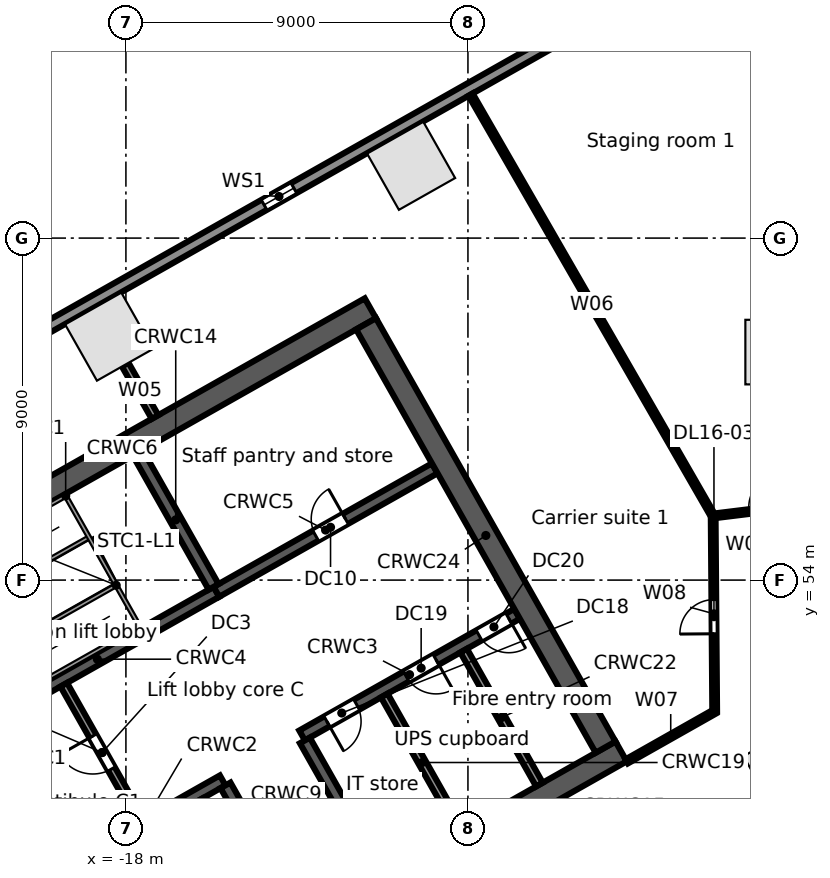
"""IFC4 building model, lengths in metres.
Left out: names, types, materials, properties, quantities, classifications, styles, units other than length and angle.
Written with IfcOpenShell. Run it as: python <this file> out.ifc"""

import sys

from ifc_helpers import new_model, si_unit, direction, frame, frame_2d, origin, origin_2d, place, context, subcontext, project, spatial, rectangle, extrude, element, fill, save


model = new_model("IFC4")
c1 = context("Model", 3, precision=1e-05, world=origin(), true_north=direction((0.0, 1.0)))
c2 = subcontext(c1, "Body", "Model", "MODEL_VIEW")
j1 = project(units=[si_unit("LENGTHUNIT", "METRE"), si_unit("PLANEANGLEUNIT", "RADIAN")], contexts=[c1])
p1 = place(None, origin())
s1 = spatial("IfcSite", under=j1, at=p1, CompositionType="ELEMENT")
p2 = place(p1, origin())
s2 = spatial("IfcBuilding", under=s1, at=p2, CompositionType="ELEMENT")
p3 = place(p2, frame((0.0, 0.0, 81.5)))
s3 = spatial("IfcBuildingStorey", under=s2, at=p3, CompositionType="ELEMENT", Elevation=81.5)
for number, where, z_axis, x_axis in (
    (1, (-10.495, 64.902, 0.0), (0.0, 0.0, 1.0), (-0.87, -0.492, 0.0)),
    (2, (-18.441, 60.406, 0.0), (0.0, 0.0, 1.0), (-0.87, -0.492, 0.0)),
    (3, (-0.591, 49.044, 0.0), (0.0, 0.0, 1.0), (0.87, 0.492, 0.0)),
    (4, (-0.85, 60.0, 0.0), (0.0, 0.0, 1.0), (0.0, 1.0, 0.0)),
):
    element("IfcColumn", number, at=place(p3, frame(where, z_axis=z_axis, x_axis=x_axis)), inside=s3, PredefinedType="COLUMN", context=c2, shape_type="SweptSolid", body=[
        extrude(rectangle(XDim=1.7, YDim=1.7, at=origin_2d()), origin(), (0.0, 0.0, 1.0), 5.0),
    ])
p4 = place(p3, frame((-58.745, 38.764, 0.0), z_axis=(0.0, 0.0, 1.0), x_axis=(0.870355811726, 0.492423355453, 0.0)))
e5 = element("IfcWall", 5, at=p4, inside=s3, PredefinedType="STANDARD", context=c2, shape_type="SweptSolid", body=[
    extrude(rectangle(XDim=64.025, YDim=0.3, at=frame_2d((32.013, 0.0))), origin(), (0.0, 0.0, 1.0), 4.68),
])
p5 = place(p4, frame((60.122, 0.0, 0.6)))
e6 = element("IfcOpeningElement", 6, at=p5, cuts=e5, PredefinedType="OPENING", context=c2, shape_type="SweptSolid", body=[
    extrude(rectangle(XDim=0.9, YDim=3.2, at=frame_2d((0.45, 1.6))), frame((0.0, 0.16, 0.0), z_axis=(0.0, -1.0, 0.0), x_axis=(1.0, 0.0, 0.0)), (0.0, 0.0, 1.0), 0.32),
])
p6 = place(p4, frame((50.992, 0.0, 0.6)))
e7 = element("IfcOpeningElement", 7, at=p6, cuts=e5, PredefinedType="OPENING", context=c2, shape_type="SweptSolid", body=[
    extrude(rectangle(XDim=0.9, YDim=3.2, at=frame_2d((0.45, 1.6))), frame((0.0, 0.16, 0.0), z_axis=(0.0, -1.0, 0.0), x_axis=(1.0, 0.0, 0.0)), (0.0, 0.0, 1.0), 0.32),
])
p7 = place(p4, frame((41.862, 0.0, 0.6)))
e8 = element("IfcOpeningElement", 8, at=p7, cuts=e5, PredefinedType="OPENING", context=c2, shape_type="SweptSolid", body=[
    extrude(rectangle(XDim=0.9, YDim=3.2, at=frame_2d((0.45, 1.6))), frame((0.0, 0.16, 0.0), z_axis=(0.0, -1.0, 0.0), x_axis=(1.0, 0.0, 0.0)), (0.0, 0.0, 1.0), 0.32),
])
p8 = place(p4, frame((32.732, 0.0, 0.6)))
e9 = element("IfcOpeningElement", 9, at=p8, cuts=e5, PredefinedType="OPENING", context=c2, shape_type="SweptSolid", body=[
    extrude(rectangle(XDim=0.9, YDim=3.2, at=frame_2d((0.45, 1.6))), frame((0.0, 0.16, 0.0), z_axis=(0.0, -1.0, 0.0), x_axis=(1.0, 0.0, 0.0)), (0.0, 0.0, 1.0), 0.32),
])
p9 = place(p4, frame((23.602, 0.0, 0.6)))
e10 = element("IfcOpeningElement", 10, at=p9, cuts=e5, PredefinedType="OPENING", context=c2, shape_type="SweptSolid", body=[
    extrude(rectangle(XDim=0.9, YDim=3.2, at=frame_2d((0.45, 1.6))), frame((0.0, 0.16, 0.0), z_axis=(0.0, -1.0, 0.0), x_axis=(1.0, 0.0, 0.0)), (0.0, 0.0, 1.0), 0.32),
])
p10 = place(p4, frame((14.472, 0.0, 0.6)))
e11 = element("IfcOpeningElement", 11, at=p10, cuts=e5, PredefinedType="OPENING", context=c2, shape_type="SweptSolid", body=[
    extrude(rectangle(XDim=0.9, YDim=3.2, at=frame_2d((0.45, 1.6))), frame((0.0, 0.16, 0.0), z_axis=(0.0, -1.0, 0.0), x_axis=(1.0, 0.0, 0.0)), (0.0, 0.0, 1.0), 0.32),
])
p11 = place(p4, frame((5.342, 0.0, 0.6)))
e12 = element("IfcOpeningElement", 12, at=p11, cuts=e5, PredefinedType="OPENING", context=c2, shape_type="SweptSolid", body=[
    extrude(rectangle(XDim=0.9, YDim=3.2, at=frame_2d((0.45, 1.6))), frame((0.0, 0.16, 0.0), z_axis=(0.0, -1.0, 0.0), x_axis=(1.0, 0.0, 0.0)), (0.0, 0.0, 1.0), 0.32),
])
p12 = place(p3, frame((-18.024, 42.104, 0.0), z_axis=(0.0, 0.0, 1.0), x_axis=(0.870360574057, 0.492414937962, 0.0)))
e13 = element("IfcWall", 13, at=p12, inside=s3, PredefinedType="SOLIDWALL", context=c2, shape_type="SweptSolid", body=[
    extrude(rectangle(XDim=15.0, YDim=0.6, at=frame_2d((7.5, 0.0))), origin(), (0.0, 0.0, 1.0), 4.68),
])
p13 = place(p12, frame((6.1, 0.0, 0.0)))
e14 = element("IfcOpeningElement", 14, at=p13, cuts=e13, PredefinedType="OPENING", context=c2, shape_type="SweptSolid", body=[
    extrude(rectangle(XDim=1.2, YDim=2.1, at=frame_2d((0.6, 1.05))), frame((0.0, 0.31, 0.0), z_axis=(0.0, -1.0, 0.0), x_axis=(1.0, 0.0, 0.0)), (0.0, 0.0, 1.0), 0.62),
])
p14 = place(p3, frame((-19.718, 46.316, 0.0), z_axis=(0.0, 0.0, 1.0), x_axis=(0.870353963862, 0.492426621528, 0.0)))
e15 = element("IfcWall", 15, at=p14, inside=s3, PredefinedType="SOLIDWALL", context=c2, shape_type="SweptSolid", body=[
    extrude(rectangle(XDim=4.9, YDim=0.3, at=frame_2d((2.45, 0.0))), origin(), (0.0, 0.0, 1.0), 4.68),
])
p15 = place(p14, frame((0.55, 0.0, 0.0)))
e16 = element("IfcOpeningElement", 16, at=p15, cuts=e15, PredefinedType="OPENING", context=c2, shape_type="SweptSolid", body=[
    extrude(rectangle(XDim=1.1, YDim=2.1, at=frame_2d((0.55, 1.05))), frame((0.0, 0.16, 0.0), z_axis=(0.0, -1.0, 0.0), x_axis=(1.0, 0.0, 0.0)), (0.0, 0.0, 1.0), 0.32),
])
p16 = place(p14, frame((2.85, 0.0, 0.0)))
e17 = element("IfcOpeningElement", 17, at=p16, cuts=e15, PredefinedType="OPENING", context=c2, shape_type="SweptSolid", body=[
    extrude(rectangle(XDim=0.9, YDim=2.1, at=frame_2d((0.45, 1.05))), frame((0.0, 0.16, 0.0), z_axis=(0.0, -1.0, 0.0), x_axis=(1.0, 0.0, 0.0)), (0.0, 0.0, 1.0), 0.32),
])
p17 = place(p3, frame((-13.365, 49.911, 0.0), z_axis=(0.0, 0.0, 1.0), x_axis=(0.870340995471, 0.49244954219, 0.0)))
e18 = element("IfcWall", 18, at=p17, inside=s3, PredefinedType="SOLIDWALL", context=c2, shape_type="SweptSolid", body=[
    extrude(rectangle(XDim=6.5, YDim=0.3, at=frame_2d((3.25, 0.0))), origin(), (0.0, 0.0, 1.0), 4.68),
])
p18 = place(p17, frame((0.75, 0.0, 0.0)))
e19 = element("IfcOpeningElement", 19, at=p18, cuts=e18, PredefinedType="OPENING", context=c2, shape_type="SweptSolid", body=[
    extrude(rectangle(XDim=0.9, YDim=2.1, at=frame_2d((0.45, 1.05))), frame((0.0, 0.16, 0.0), z_axis=(0.0, -1.0, 0.0), x_axis=(1.0, 0.0, 0.0)), (0.0, 0.0, 1.0), 0.32),
])
p19 = place(p17, frame((3.15, 0.0, 0.0)))
e20 = element("IfcOpeningElement", 20, at=p19, cuts=e18, PredefinedType="OPENING", context=c2, shape_type="SweptSolid", body=[
    extrude(rectangle(XDim=0.9, YDim=2.1, at=frame_2d((0.45, 1.05))), frame((0.0, 0.16, 0.0), z_axis=(0.0, -1.0, 0.0), x_axis=(1.0, 0.0, 0.0)), (0.0, 0.0, 1.0), 0.32),
])
p20 = place(p17, frame((5.35, 0.0, 0.0)))
e21 = element("IfcOpeningElement", 21, at=p20, cuts=e18, PredefinedType="OPENING", context=c2, shape_type="SweptSolid", body=[
    extrude(rectangle(XDim=0.9, YDim=2.1, at=frame_2d((0.45, 1.05))), frame((0.0, 0.16, 0.0), z_axis=(0.0, -1.0, 0.0), x_axis=(1.0, 0.0, 0.0)), (0.0, 0.0, 1.0), 0.32),
])
p21 = place(p3, frame((-21.885, 50.146, 0.0), z_axis=(0.0, 0.0, 1.0), x_axis=(0.870359411463, 0.492416992881, 0.0)))
e22 = element("IfcWall", 22, at=p21, inside=s3, PredefinedType="SOLIDWALL", context=c2, shape_type="SweptSolid", body=[
    extrude(rectangle(XDim=7.2, YDim=0.3, at=frame_2d((3.6, 0.0))), origin(), (0.0, 0.0, 1.0), 4.68),
])
p22 = place(p21, frame((0.2, 0.0, 0.0)))
e23 = element("IfcOpeningElement", 23, at=p22, cuts=e22, PredefinedType="OPENING", context=c2, shape_type="SweptSolid", body=[
    extrude(rectangle(XDim=1.0, YDim=2.1, at=frame_2d((0.5, 1.05))), frame((0.0, 0.16, 0.0), z_axis=(0.0, -1.0, 0.0), x_axis=(1.0, 0.0, 0.0)), (0.0, 0.0, 1.0), 0.32),
])
p23 = place(p3, frame((-15.618, 53.691, 0.0), z_axis=(0.0, 0.0, 1.0), x_axis=(0.870356769198, 0.492421663121, 0.0)))
e24 = element("IfcWall", 24, at=p23, inside=s3, PredefinedType="SOLIDWALL", context=c2, shape_type="SweptSolid", body=[
    extrude(rectangle(XDim=6.6, YDim=0.3, at=frame_2d((3.3, 0.0))), origin(), (0.0, 0.0, 1.0), 4.68),
])
p24 = place(p23, frame((3.0, 0.0, 0.0)))
e25 = element("IfcOpeningElement", 25, at=p24, cuts=e24, PredefinedType="OPENING", context=c2, shape_type="SweptSolid", body=[
    extrude(rectangle(XDim=0.9, YDim=2.1, at=frame_2d((0.45, 1.05))), frame((0.0, 0.16, 0.0), z_axis=(0.0, -1.0, 0.0), x_axis=(1.0, 0.0, 0.0)), (0.0, 0.0, 1.0), 0.32),
])
p25 = place(p3, frame((-24.623, 53.767, 0.0), z_axis=(0.0, 0.0, 1.0), x_axis=(0.870356627484, 0.492421913601, 0.0)))
e26 = element("IfcWall", 26, at=p25, inside=s3, PredefinedType="SOLIDWALL", context=c2, shape_type="SweptSolid", body=[
    extrude(rectangle(XDim=15.0, YDim=0.6, at=frame_2d((7.5, 0.0))), origin(), (0.0, 0.0, 1.0), 4.68),
])
p26 = place(p3, frame((-24.214, 53.654, 0.0), z_axis=(0.0, 0.0, 1.0), x_axis=(0.492441221355, -0.870345703448, 0.0)))
e27 = element("IfcWall", 27, at=p26, inside=s3, PredefinedType="SOLIDWALL", context=c2, shape_type="SweptSolid", body=[
    extrude(rectangle(XDim=12.8, YDim=0.6, at=frame_2d((6.4, 0.0))), origin(), (0.0, 0.0, 1.0), 4.68),
])
p27 = place(p3, frame((-19.635, 51.246, 0.0), z_axis=(0.0, 0.0, 1.0), x_axis=(0.492408451753, -0.87036424366, 0.0)))
e28 = element("IfcWall", 28, at=p27, inside=s3, PredefinedType="PARTITIONING", context=c2, shape_type="SweptSolid", body=[
    extrude(rectangle(XDim=4.1, YDim=0.2, at=frame_2d((2.05, 0.0))), origin(), (0.0, 0.0, 1.0), 4.68),
])
p28 = place(p27, frame((1.55, 0.0, 0.0)))
e29 = element("IfcOpeningElement", 29, at=p28, cuts=e28, PredefinedType="OPENING", context=c2, shape_type="SweptSolid", body=[
    extrude(rectangle(XDim=1.0, YDim=2.1, at=frame_2d((0.5, 1.05))), frame((0.0, 0.11, 0.0), z_axis=(0.0, -1.0, 0.0), x_axis=(1.0, 0.0, 0.0)), (0.0, 0.0, 1.0), 0.22),
])
p29 = place(p3, frame((-15.379, 48.599, 0.0), z_axis=(0.0, 0.0, 1.0), x_axis=(0.492394910396, -0.870371904542, 0.0)))
e30 = element("IfcWall", 30, at=p29, inside=s3, PredefinedType="SOLIDWALL", context=c2, shape_type="SweptSolid", body=[
    extrude(rectangle(XDim=4.05, YDim=0.3, at=frame_2d((2.025, 0.0))), origin(), (0.0, 0.0, 1.0), 4.68),
])
p30 = place(p3, frame((-17.686, 57.347, 0.0), z_axis=(0.0, 0.0, 1.0), x_axis=(0.492420746998, -0.870357287513, 0.0)))
e31 = element("IfcWall", 31, at=p30, inside=s3, PredefinedType="SOLIDWALL", context=c2, shape_type="SweptSolid", body=[
    extrude(rectangle(XDim=4.05, YDim=0.3, at=frame_2d((2.025, 0.0))), origin(), (0.0, 0.0, 1.0), 4.68),
])
p31 = place(p3, frame((-13.291, 49.781, 0.0), z_axis=(0.0, 0.0, 1.0), x_axis=(0.492394910396, -0.870371904542, 0.0)))
e32 = element("IfcWall", 32, at=p31, inside=s3, PredefinedType="SOLIDWALL", context=c2, shape_type="SweptSolid", body=[
    extrude(rectangle(XDim=4.05, YDim=0.3, at=frame_2d((2.025, 0.0))), origin(), (0.0, 0.0, 1.0), 4.68),
])
p32 = place(p3, frame((-11.202, 50.962, 0.0), z_axis=(0.0, 0.0, 1.0), x_axis=(0.49241474071, -0.870360685654, 0.0)))
e33 = element("IfcWall", 33, at=p32, inside=s3, PredefinedType="PARTITIONING", context=c2, shape_type="SweptSolid", body=[
    extrude(rectangle(XDim=4.05, YDim=0.2, at=frame_2d((2.025, 0.0))), origin(), (0.0, 0.0, 1.0), 4.68),
])
p33 = place(p3, frame((-9.113, 52.144, 0.0), z_axis=(0.0, 0.0, 1.0), x_axis=(0.492394910396, -0.870371904542, 0.0)))
e34 = element("IfcWall", 34, at=p33, inside=s3, PredefinedType="PARTITIONING", context=c2, shape_type="SweptSolid", body=[
    extrude(rectangle(XDim=4.05, YDim=0.2, at=frame_2d((2.025, 0.0))), origin(), (0.0, 0.0, 1.0), 4.68),
])
p34 = place(p3, frame((-11.681, 60.744, 0.0), z_axis=(0.0, 0.0, 1.0), x_axis=(0.492426772896, -0.870353878221, 0.0)))
e35 = element("IfcWall", 35, at=p34, inside=s3, PredefinedType="SOLIDWALL", context=c2, shape_type="SweptSolid", body=[
    extrude(rectangle(XDim=12.8, YDim=0.6, at=frame_2d((6.4, 0.0))), origin(), (0.0, 0.0, 1.0), 4.68),
])
p35 = place(p3, frame((-18.018, 59.669, 0.0), z_axis=(0.0, 0.0, 1.0), x_axis=(0.494877399769, -0.868962806568, 0.0)))
e36 = element("IfcWall", 36, at=p35, inside=s3, PredefinedType="PARTITIONING", context=c2, shape_type="SweptSolid", body=[
    extrude(rectangle(XDim=1.584, YDim=0.2, at=frame_2d((0.792, 0.0))), origin(), (0.0, 0.0, 1.0), 4.26),
])
p36 = place(p3, frame((-8.931, 66.775, 0.0), z_axis=(0.0, 0.0, 1.0), x_axis=(0.498955759248, -0.866627457627, 0.0)))
e37 = element("IfcWall", 37, at=p36, inside=s3, PredefinedType="PARTITIONING", context=c2, shape_type="SweptSolid", body=[
    extrude(rectangle(XDim=12.794, YDim=0.125, at=frame_2d((6.397, 0.0))), origin(), (0.0, 0.0, 1.0), 3.76),
])
p37 = place(p3, frame((-4.821, 49.23, 0.0), z_axis=(0.0, 0.0, 1.0), x_axis=(0.870371217631, 0.492396124598, 0.0)))
e38 = element("IfcWall", 38, at=p37, inside=s3, PredefinedType="PARTITIONING", context=c2, shape_type="SweptSolid", body=[
    extrude(rectangle(XDim=2.659, YDim=0.125, at=frame_2d((1.329, 0.0))), origin(), (0.0, 0.0, 1.0), 4.68),
])
p38 = place(p3, frame((-2.547, 55.687, 0.0), z_axis=(0.0, 0.0, 1.0), x_axis=(0.007777437156, -0.999969755278, 0.0)))
e39 = element("IfcWall", 39, at=p38, inside=s3, PredefinedType="PARTITIONING", context=c2, shape_type="SweptSolid", body=[
    extrude(rectangle(XDim=5.148, YDim=0.125, at=frame_2d((2.574, 0.0))), origin(), (0.0, 0.0, 1.0), 4.68),
])
p39 = place(p38, frame((2.2, 0.0, 0.0)))
e40 = element("IfcOpeningElement", 40, at=p39, cuts=e39, PredefinedType="OPENING", context=c2, shape_type="SweptSolid", body=[
    extrude(rectangle(XDim=0.9, YDim=2.1, at=frame_2d((0.45, 1.05))), frame((0.0, 0.073, 0.0), z_axis=(0.0, -1.0, 0.0), x_axis=(1.0, 0.0, 0.0)), (0.0, 0.0, 1.0), 0.145),
])
p40 = place(p3, frame((-2.547, 55.687, 0.0), z_axis=(0.0, 0.0, 1.0), x_axis=(0.992534770107, 0.121962002806, 0.0)))
e41 = element("IfcWall", 41, at=p40, inside=s3, PredefinedType="PARTITIONING", context=c2, shape_type="SweptSolid", body=[
    extrude(rectangle(XDim=2.566, YDim=0.125, at=frame_2d((1.283, 0.0))), origin(), (0.0, 0.0, 1.0), 3.742),
])
p41 = place(p40, frame((0.95, 0.0, 0.0)))
e42 = element("IfcOpeningElement", 42, at=p41, cuts=e41, PredefinedType="OPENING", context=c2, shape_type="SweptSolid", body=[
    extrude(rectangle(XDim=0.9, YDim=2.1, at=frame_2d((0.45, 1.05))), frame((0.0, 0.073, 0.0), z_axis=(0.0, -1.0, 0.0), x_axis=(1.0, 0.0, 0.0)), (0.0, 0.0, 1.0), 0.145),
])
p42 = place(p6, origin())
e43 = element("IfcWindow", 43, at=p42, inside=s3, PartitioningType="SINGLE_PANEL", PredefinedType="WINDOW", context=c2, shape_type="SweptSolid", body=[
    extrude(rectangle(XDim=0.9, YDim=3.2, at=frame_2d((0.45, 1.6))), frame((0.0, 0.03, 0.0), z_axis=(0.0, -1.0, 0.0), x_axis=(1.0, 0.0, 0.0)), (0.0, 0.0, 1.0), 0.06),
])
fill(e7, e43)
p43 = place(p28, frame((1.0, 0.0, 0.0), z_axis=(0.0, 0.0, 1.0), x_axis=(-1.0, 0.0, 0.0)))
e44 = element("IfcDoor", 44, at=p43, inside=s3, OperationType="SINGLE_SWING_RIGHT", PredefinedType="DOOR", context=c2, shape_type="SweptSolid", body=[
    extrude(rectangle(XDim=1.0, YDim=2.1, at=frame_2d((0.5, 1.05))), frame((0.0, 0.025, 0.0), z_axis=(0.0, -1.0, 0.0), x_axis=(1.0, 0.0, 0.0)), (0.0, 0.0, 1.0), 0.05),
])
fill(e29, e44)
p44 = place(p24, origin())
e45 = element("IfcDoor", 45, at=p44, inside=s3, OperationType="SINGLE_SWING_RIGHT", PredefinedType="DOOR", context=c2, shape_type="SweptSolid", body=[
    extrude(rectangle(XDim=0.9, YDim=2.1, at=frame_2d((0.45, 1.05))), frame((0.0, 0.025, 0.0), z_axis=(0.0, -1.0, 0.0), x_axis=(1.0, 0.0, 0.0)), (0.0, 0.0, 1.0), 0.05),
])
fill(e25, e45)
p45 = place(p18, frame((0.9, 0.0, 0.0), z_axis=(0.0, 0.0, 1.0), x_axis=(-1.0, 0.0, 0.0)))
e46 = element("IfcDoor", 46, at=p45, inside=s3, OperationType="SINGLE_SWING_RIGHT", PredefinedType="DOOR", context=c2, shape_type="SweptSolid", body=[
    extrude(rectangle(XDim=0.9, YDim=2.1, at=frame_2d((0.45, 1.05))), frame((0.0, 0.025, 0.0), z_axis=(0.0, -1.0, 0.0), x_axis=(1.0, 0.0, 0.0)), (0.0, 0.0, 1.0), 0.05),
])
fill(e19, e46)
p46 = place(p19, frame((0.9, 0.0, 0.0), z_axis=(0.0, 0.0, 1.0), x_axis=(-1.0, 0.0, 0.0)))
e47 = element("IfcDoor", 47, at=p46, inside=s3, OperationType="SINGLE_SWING_LEFT", PredefinedType="DOOR", context=c2, shape_type="SweptSolid", body=[
    extrude(rectangle(XDim=0.9, YDim=2.1, at=frame_2d((0.45, 1.05))), frame((0.0, 0.025, 0.0), z_axis=(0.0, -1.0, 0.0), x_axis=(1.0, 0.0, 0.0)), (0.0, 0.0, 1.0), 0.05),
])
fill(e20, e47)
p47 = place(p20, frame((0.9, 0.0, 0.0), z_axis=(0.0, 0.0, 1.0), x_axis=(-1.0, 0.0, 0.0)))
e48 = element("IfcDoor", 48, at=p47, inside=s3, OperationType="SINGLE_SWING_LEFT", PredefinedType="DOOR", context=c2, shape_type="SweptSolid", body=[
    extrude(rectangle(XDim=0.9, YDim=2.1, at=frame_2d((0.45, 1.05))), frame((0.0, 0.025, 0.0), z_axis=(0.0, -1.0, 0.0), x_axis=(1.0, 0.0, 0.0)), (0.0, 0.0, 1.0), 0.05),
])
fill(e21, e48)
p48 = place(p39, frame((0.9, 0.0, 0.0), z_axis=(0.0, 0.0, 1.0), x_axis=(-1.0, 0.0, 0.0)))
e49 = element("IfcDoor", 49, at=p48, inside=s3, OperationType="SINGLE_SWING_LEFT", PredefinedType="DOOR", context=c2, shape_type="SweptSolid", body=[
    extrude(rectangle(XDim=0.9, YDim=2.1, at=frame_2d((0.45, 1.05))), frame((0.0, 0.025, 0.0), z_axis=(0.0, -1.0, 0.0), x_axis=(1.0, 0.0, 0.0)), (0.0, 0.0, 1.0), 0.05),
])
fill(e40, e49)
p49 = place(p41, origin())
e50 = element("IfcDoor", 50, at=p49, inside=s3, OperationType="SINGLE_SWING_RIGHT", PredefinedType="DOOR", context=c2, shape_type="SweptSolid", body=[
    extrude(rectangle(XDim=0.9, YDim=2.1, at=frame_2d((0.45, 1.05))), frame((0.0, 0.025, 0.0), z_axis=(0.0, -1.0, 0.0), x_axis=(1.0, 0.0, 0.0)), (0.0, 0.0, 1.0), 0.05),
])
fill(e42, e50)
save(model, sys.argv[1])
